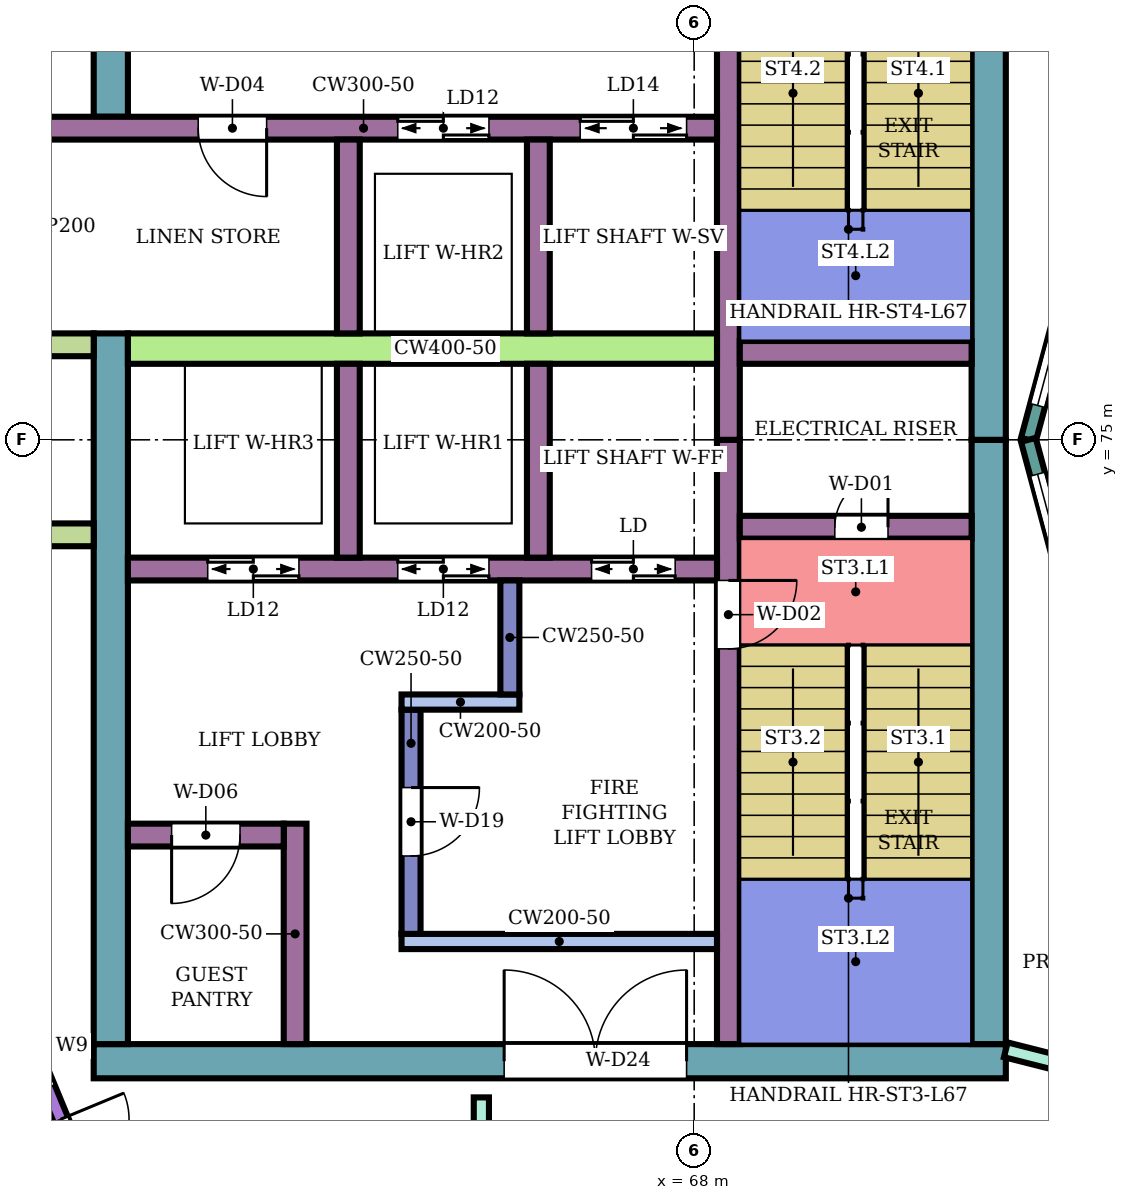
"""IFC4 building model, lengths in metres.
Left out: names, types, materials, properties, quantities, classifications, styles, units other than length and angle.
Written with IfcOpenShell. Run it as: python <this file> out.ifc"""

import sys

from ifc_helpers import new_model, si_unit, direction, frame, frame_2d, origin, place, context, subcontext, project, spatial, rectangle, extrude, element, fill, save


model = new_model("IFC4")
c1 = context("Model", 3, precision=1e-05, world=origin(), true_north=direction((0.0, 1.0)))
c2 = subcontext(c1, "Body", "Model", "MODEL_VIEW")
j1 = project(units=[si_unit("LENGTHUNIT", "METRE"), si_unit("PLANEANGLEUNIT", "RADIAN")], contexts=[c1])
p1 = place(None, origin())
s1 = spatial("IfcSite", under=j1, at=p1, CompositionType="ELEMENT")
p2 = place(p1, origin())
s2 = spatial("IfcBuilding", under=s1, at=p2, CompositionType="ELEMENT")
p3 = place(p2, frame((0.0, 0.0, 292.5)))
s3 = spatial("IfcBuildingStorey", under=s2, at=p3, CompositionType="ELEMENT", Elevation=292.5)
p4 = place(p3, frame((72.1, 66.825, 0.0), z_axis=(0.0, 0.0, 1.0), x_axis=(-1.0, 0.0, 0.0)))
e1 = element("IfcWall", 1, at=p4, inside=s3, PredefinedType="SHEAR", context=c2, shape_type="SweptSolid", body=[
    extrude(rectangle(XDim=12.0, YDim=0.45, at=frame_2d((6.0, 0.0))), origin(), (0.0, 0.0, 1.0), 3.88),
])
p5 = place(p4, frame((4.2, 0.0, 0.0)))
e2 = element("IfcOpeningElement", 2, at=p5, cuts=e1, PredefinedType="OPENING", context=c2, shape_type="SweptSolid", body=[
    extrude(rectangle(XDim=2.4, YDim=2.4, at=frame_2d((1.2, 1.2))), frame((0.0, 0.235, 0.0), z_axis=(0.0, -1.0, 0.0), x_axis=(1.0, 0.0, 0.0)), (0.0, 0.0, 1.0), 0.47),
])
for number, where, z_axis, x_axis in (
    (3, (71.875, 75.0, 0.0), (0.0, 0.0, 1.0), (0.0, -1.0, 0.0)),
    (4, (71.875, 82.95, 0.0), (0.0, 0.0, 1.0), (0.0, -1.0, 0.0)),
):
    element("IfcWall", number, at=place(p3, frame(where, z_axis=z_axis, x_axis=x_axis)), inside=s3, PredefinedType="SHEAR", context=c2, shape_type="SweptSolid", body=[
        extrude(rectangle(XDim=7.95, YDim=0.45, at=frame_2d((3.975, 0.0))), origin(), (0.0, 0.0, 1.0), 3.88),
    ])
p6 = place(p3, frame((60.325, 76.4, 0.0), z_axis=(0.0, 0.0, 1.0), x_axis=(0.0, -1.0, 0.0)))
e5 = element("IfcWall", 5, at=p6, inside=s3, PredefinedType="SHEAR", context=c2, shape_type="SweptSolid", body=[
    extrude(rectangle(XDim=9.35, YDim=0.45, at=frame_2d((4.675, 0.0))), origin(), (0.0, 0.0, 1.0), 3.88),
])
p7 = place(p3, frame((60.325, 82.95, 0.0), z_axis=(0.0, 0.0, 1.0), x_axis=(0.0, -1.0, 0.0)))
e6 = element("IfcWall", 6, at=p7, inside=s3, PredefinedType="SHEAR", context=c2, shape_type="SweptSolid", body=[
    extrude(rectangle(XDim=3.7, YDim=0.45, at=frame_2d((1.85, 0.0))), origin(), (0.0, 0.0, 1.0), 3.88),
])
p8 = place(p3, frame((68.45, 75.0, 0.0), z_axis=(0.0, 0.0, 1.0), x_axis=(0.0, -1.0, 0.0)))
e7 = element("IfcWall", 7, at=p8, inside=s3, PredefinedType="SHEAR", context=c2, shape_type="SweptSolid", body=[
    extrude(rectangle(XDim=7.95, YDim=0.3, at=frame_2d((3.975, 0.0))), origin(), (0.0, 0.0, 1.0), 3.88),
])
p9 = place(p8, frame((1.85, 0.0, 0.0)))
e8 = element("IfcOpeningElement", 8, at=p9, cuts=e7, PredefinedType="OPENING", context=c2, shape_type="SweptSolid", body=[
    extrude(rectangle(XDim=0.9, YDim=2.1, at=frame_2d((0.45, 1.05))), frame((0.0, 0.16, 0.0), z_axis=(0.0, -1.0, 0.0), x_axis=(1.0, 0.0, 0.0)), (0.0, 0.0, 1.0), 0.32),
])
p10 = place(p3, frame((68.45, 82.95, 0.0), z_axis=(0.0, 0.0, 1.0), x_axis=(0.0, -1.0, 0.0)))
e9 = element("IfcWall", 9, at=p10, inside=s3, PredefinedType="SHEAR", context=c2, shape_type="SweptSolid", body=[
    extrude(rectangle(XDim=7.95, YDim=0.3, at=frame_2d((3.975, 0.0))), origin(), (0.0, 0.0, 1.0), 3.88),
])
p11 = place(p10, frame((0.6, 0.0, 0.0)))
e10 = element("IfcOpeningElement", 10, at=p11, cuts=e9, PredefinedType="OPENING", context=c2, shape_type="SweptSolid", body=[
    extrude(rectangle(XDim=0.9, YDim=2.1, at=frame_2d((0.45, 1.05))), frame((0.0, 0.16, 0.0), z_axis=(0.0, -1.0, 0.0), x_axis=(1.0, 0.0, 0.0)), (0.0, 0.0, 1.0), 0.32),
])
p12 = place(p3, frame((71.65, 73.85, 0.0), z_axis=(0.0, 0.0, 1.0), x_axis=(-1.0, 0.0, 0.0)))
e11 = element("IfcWall", 11, at=p12, inside=s3, PredefinedType="SHEAR", context=c2, shape_type="SweptSolid", body=[
    extrude(rectangle(XDim=3.05, YDim=0.3, at=frame_2d((1.525, 0.0))), origin(), (0.0, 0.0, 1.0), 3.88),
])
p13 = place(p12, frame((1.1, 0.0, 0.0)))
e12 = element("IfcOpeningElement", 12, at=p13, cuts=e11, PredefinedType="OPENING", context=c2, shape_type="SweptSolid", body=[
    extrude(rectangle(XDim=0.7, YDim=2.0, at=frame_2d((0.35, 1.0))), frame((0.0, 0.16, 0.0), z_axis=(0.0, -1.0, 0.0), x_axis=(1.0, 0.0, 0.0)), (0.0, 0.0, 1.0), 0.32),
])
p14 = place(p3, frame((71.65, 76.15, 0.0), z_axis=(0.0, 0.0, 1.0), x_axis=(-1.0, 0.0, 0.0)))
e13 = element("IfcWall", 13, at=p14, inside=s3, PredefinedType="SHEAR", context=c2, shape_type="SweptSolid", body=[
    extrude(rectangle(XDim=3.05, YDim=0.3, at=frame_2d((1.525, 0.0))), origin(), (0.0, 0.0, 1.0), 3.88),
])
p15 = place(p3, frame((68.3, 73.3, 0.0), z_axis=(0.0, 0.0, 1.0), x_axis=(-1.0, 0.0, 0.0)))
e14 = element("IfcWall", 14, at=p15, inside=s3, PredefinedType="SHEAR", context=c2, shape_type="SweptSolid", body=[
    extrude(rectangle(XDim=7.75, YDim=0.3, at=frame_2d((3.875, 0.0))), origin(), (0.0, 0.0, 1.0), 3.88),
])
p16 = place(p15, frame((0.55, 0.0, 0.0)))
e15 = element("IfcOpeningElement", 15, at=p16, cuts=e14, PredefinedType="OPENING", context=c2, shape_type="SweptSolid", body=[
    extrude(rectangle(XDim=1.1, YDim=2.1, at=frame_2d((0.55, 1.05))), frame((0.0, 0.16, 0.0), z_axis=(0.0, -1.0, 0.0), x_axis=(1.0, 0.0, 0.0)), (0.0, 0.0, 1.0), 0.32),
])
p17 = place(p15, frame((3.0, 0.0, 0.0)))
e16 = element("IfcOpeningElement", 16, at=p17, cuts=e14, PredefinedType="OPENING", context=c2, shape_type="SweptSolid", body=[
    extrude(rectangle(XDim=1.2, YDim=2.1, at=frame_2d((0.6, 1.05))), frame((0.0, 0.16, 0.0), z_axis=(0.0, -1.0, 0.0), x_axis=(1.0, 0.0, 0.0)), (0.0, 0.0, 1.0), 0.32),
])
p18 = place(p15, frame((5.5, 0.0, 0.0)))
e17 = element("IfcOpeningElement", 17, at=p18, cuts=e14, PredefinedType="OPENING", context=c2, shape_type="SweptSolid", body=[
    extrude(rectangle(XDim=1.2, YDim=2.1, at=frame_2d((0.6, 1.05))), frame((0.0, 0.16, 0.0), z_axis=(0.0, -1.0, 0.0), x_axis=(1.0, 0.0, 0.0)), (0.0, 0.0, 1.0), 0.32),
])
p19 = place(p3, frame((68.3, 76.2, 0.0), z_axis=(0.0, 0.0, 1.0), x_axis=(-1.0, 0.0, 0.0)))
e18 = element("IfcWall", 18, at=p19, inside=s3, PredefinedType="SHEAR", context=c2, shape_type="SweptSolid", body=[
    extrude(rectangle(XDim=7.75, YDim=0.4, at=frame_2d((3.875, 0.0))), origin(), (0.0, 0.0, 1.0), 3.88),
])
p20 = place(p3, frame((68.3, 79.1, 0.0), z_axis=(0.0, 0.0, 1.0), x_axis=(-1.0, 0.0, 0.0)))
e19 = element("IfcWall", 19, at=p20, inside=s3, PredefinedType="SHEAR", context=c2, shape_type="SweptSolid", body=[
    extrude(rectangle(XDim=9.3, YDim=0.3, at=frame_2d((4.65, 0.0))), origin(), (0.0, 0.0, 1.0), 3.88),
])
p21 = place(p20, frame((0.4, 0.0, 0.0)))
e20 = element("IfcOpeningElement", 20, at=p21, cuts=e19, PredefinedType="OPENING", context=c2, shape_type="SweptSolid", body=[
    extrude(rectangle(XDim=1.4, YDim=2.1, at=frame_2d((0.7, 1.05))), frame((0.0, 0.16, 0.0), z_axis=(0.0, -1.0, 0.0), x_axis=(1.0, 0.0, 0.0)), (0.0, 0.0, 1.0), 0.32),
])
p22 = place(p20, frame((3.0, 0.0, 0.0)))
e21 = element("IfcOpeningElement", 21, at=p22, cuts=e19, PredefinedType="OPENING", context=c2, shape_type="SweptSolid", body=[
    extrude(rectangle(XDim=1.2, YDim=2.1, at=frame_2d((0.6, 1.05))), frame((0.0, 0.16, 0.0), z_axis=(0.0, -1.0, 0.0), x_axis=(1.0, 0.0, 0.0)), (0.0, 0.0, 1.0), 0.32),
])
p23 = place(p20, frame((5.925, 0.0, 0.0)))
e22 = element("IfcOpeningElement", 22, at=p23, cuts=e19, PredefinedType="OPENING", context=c2, shape_type="SweptSolid", body=[
    extrude(rectangle(XDim=0.9, YDim=2.1, at=frame_2d((0.45, 1.05))), frame((0.0, 0.16, 0.0), z_axis=(0.0, -1.0, 0.0), x_axis=(1.0, 0.0, 0.0)), (0.0, 0.0, 1.0), 0.32),
])
for number, where, z_axis, x_axis in (
    (23, (65.95, 76.0, 0.0), (0.0, 0.0, 1.0), (0.0, -1.0, 0.0)),
    (24, (63.45, 76.0, 0.0), (0.0, 0.0, 1.0), (0.0, -1.0, 0.0)),
    (25, (65.95, 78.95, 0.0), (0.0, 0.0, 1.0), (0.0, -1.0, 0.0)),
    (26, (63.45, 78.95, 0.0), (0.0, 0.0, 1.0), (0.0, -1.0, 0.0)),
):
    element("IfcWall", number, at=place(p3, frame(where, z_axis=z_axis, x_axis=x_axis)), inside=s3, PredefinedType="SHEAR", context=c2, shape_type="SweptSolid", body=[
        extrude(rectangle(XDim=2.55, YDim=0.3, at=frame_2d((1.275, 0.0))), origin(), (0.0, 0.0, 1.0), 3.88),
    ])
p24 = place(p3, frame((68.3, 68.4, 0.0), z_axis=(0.0, 0.0, 1.0), x_axis=(-1.0, 0.0, 0.0)))
e27 = element("IfcWall", 27, at=p24, inside=s3, PredefinedType="SHEAR", context=c2, shape_type="SweptSolid", body=[
    extrude(rectangle(XDim=4.15, YDim=0.2, at=frame_2d((2.075, 0.0))), origin(), (0.0, 0.0, 1.0), 3.88),
])
p25 = place(p3, frame((64.275, 71.45, 0.0), z_axis=(0.0, 0.0, 1.0), x_axis=(0.0, -1.0, 0.0)))
e28 = element("IfcWall", 28, at=p25, inside=s3, PredefinedType="SHEAR", context=c2, shape_type="SweptSolid", body=[
    extrude(rectangle(XDim=2.95, YDim=0.25, at=frame_2d((1.475, 0.0))), origin(), (0.0, 0.0, 1.0), 3.88),
])
p26 = place(p25, frame((1.025, 0.0, 0.0)))
e29 = element("IfcOpeningElement", 29, at=p26, cuts=e28, PredefinedType="OPENING", context=c2, shape_type="SweptSolid", body=[
    extrude(rectangle(XDim=0.9, YDim=2.1, at=frame_2d((0.45, 1.05))), frame((0.0, 0.135, 0.0), z_axis=(0.0, -1.0, 0.0), x_axis=(1.0, 0.0, 0.0)), (0.0, 0.0, 1.0), 0.27),
])
p27 = place(p3, frame((65.7, 71.55, 0.0), z_axis=(0.0, 0.0, 1.0), x_axis=(-1.0, 0.0, 0.0)))
e30 = element("IfcWall", 30, at=p27, inside=s3, PredefinedType="SHEAR", context=c2, shape_type="SweptSolid", body=[
    extrude(rectangle(XDim=1.55, YDim=0.2, at=frame_2d((0.775, 0.0))), origin(), (0.0, 0.0, 1.0), 3.88),
])
p28 = place(p3, frame((65.575, 73.15, 0.0), z_axis=(0.0, 0.0, 1.0), x_axis=(0.0, -1.0, 0.0)))
e31 = element("IfcWall", 31, at=p28, inside=s3, PredefinedType="SHEAR", context=c2, shape_type="SweptSolid", body=[
    extrude(rectangle(XDim=1.5, YDim=0.25, at=frame_2d((0.75, 0.0))), origin(), (0.0, 0.0, 1.0), 3.88),
])
p29 = place(p3, frame((62.75, 69.95, 0.0), z_axis=(0.0, 0.0, 1.0), x_axis=(0.0, -1.0, 0.0)))
e32 = element("IfcWall", 32, at=p29, inside=s3, PredefinedType="SHEAR", context=c2, shape_type="SweptSolid", body=[
    extrude(rectangle(XDim=2.9, YDim=0.3, at=frame_2d((1.45, 0.0))), origin(), (0.0, 0.0, 1.0), 3.88),
])
p30 = place(p3, frame((62.6, 69.8, 0.0), z_axis=(0.0, 0.0, 1.0), x_axis=(-1.0, 0.0, 0.0)))
e33 = element("IfcWall", 33, at=p30, inside=s3, PredefinedType="SHEAR", context=c2, shape_type="SweptSolid", body=[
    extrude(rectangle(XDim=2.05, YDim=0.3, at=frame_2d((1.025, 0.0))), origin(), (0.0, 0.0, 1.0), 3.88),
])
p31 = place(p30, frame((0.575, 0.0, 0.0)))
e34 = element("IfcOpeningElement", 34, at=p31, cuts=e33, PredefinedType="OPENING", context=c2, shape_type="SweptSolid", body=[
    extrude(rectangle(XDim=0.9, YDim=2.1, at=frame_2d((0.45, 1.05))), frame((0.0, 0.16, 0.0), z_axis=(0.0, -1.0, 0.0), x_axis=(1.0, 0.0, 0.0)), (0.0, 0.0, 1.0), 0.32),
])
p32 = place(p3, frame((58.364, 69.203, 0.0), z_axis=(0.0, 0.0, 1.0), x_axis=(0.382708254591, -0.923869250418, 0.0)))
e35 = element("IfcWall", 35, at=p32, inside=s3, PredefinedType="NOTDEFINED", context=c2, shape_type="SweptSolid", body=[
    extrude(rectangle(XDim=5.847, YDim=0.2, at=frame_2d((2.924, 0.0))), origin(), (0.0, 0.0, 1.0), 4.2),
])
p33 = place(p32, frame((1.75, 0.0, 0.9)))
e36 = element("IfcOpeningElement", 36, at=p33, cuts=e35, PredefinedType="OPENING", context=c2, shape_type="SweptSolid", body=[
    extrude(rectangle(XDim=1.2, YDim=2.7, at=frame_2d((0.6, 1.35))), frame((0.0, 0.11, 0.0), z_axis=(0.0, -1.0, 0.0), x_axis=(1.0, 0.0, 0.0)), (0.0, 0.0, 1.0), 0.22),
])
p34 = place(p32, frame((3.4, 0.0, 0.0)))
e37 = element("IfcOpeningElement", 37, at=p34, cuts=e35, PredefinedType="OPENING", context=c2, shape_type="SweptSolid", body=[
    extrude(rectangle(XDim=1.8, YDim=2.7, at=frame_2d((0.9, 1.35))), frame((0.0, 0.11, 0.0), z_axis=(0.0, -1.0, 0.0), x_axis=(1.0, 0.0, 0.0)), (0.0, 0.0, 1.0), 0.22),
])
for number, where, z_axis, x_axis in (
    (38, (60.1, 76.25, 0.0), (0.0, 0.0, 1.0), (-1.0, 0.0, 0.0)),
    (39, (60.1, 73.75, 0.0), (0.0, 0.0, 1.0), (-1.0, 0.0, 0.0)),
):
    element("IfcWall", number, at=place(p3, frame(where, z_axis=z_axis, x_axis=x_axis)), inside=s3, PredefinedType="NOTDEFINED", context=c2, shape_type="SweptSolid", body=[
        extrude(rectangle(XDim=2.416, YDim=0.3, at=frame_2d((1.208, 0.0))), origin(), (0.0, 0.0, 1.0), 4.2),
    ])
p35 = place(p3, frame((73.415, 78.802, 0.0), z_axis=(0.0, 0.0, 1.0), x_axis=(-0.258789828301, -0.965933654434, 0.0)))
e40 = element("IfcWall", 40, at=p35, inside=s3, PredefinedType="NOTDEFINED", context=c2, shape_type="SweptSolid", body=[
    extrude(rectangle(XDim=3.936, YDim=0.2, at=frame_2d((1.968, 0.0))), origin(), (0.0, 0.0, 1.0), 4.2),
])
p36 = place(p35, frame((0.468, 0.0, 0.9)))
e41 = element("IfcOpeningElement", 41, at=p36, cuts=e40, PredefinedType="OPENING", context=c2, shape_type="SweptSolid", body=[
    extrude(rectangle(XDim=3.0, YDim=2.3, at=frame_2d((1.5, 1.15))), frame((0.0, 0.11, 0.0), z_axis=(0.0, -1.0, 0.0), x_axis=(1.0, 0.0, 0.0)), (0.0, 0.0, 1.0), 0.22),
])
p37 = place(p3, frame((72.396, 75.0, 0.0), z_axis=(0.0, 0.0, 1.0), x_axis=(0.258789828301, -0.965933654434, 0.0)))
e42 = element("IfcWall", 42, at=p37, inside=s3, PredefinedType="NOTDEFINED", context=c2, shape_type="SweptSolid", body=[
    extrude(rectangle(XDim=3.936, YDim=0.2, at=frame_2d((1.968, 0.0))), origin(), (0.0, 0.0, 1.0), 4.2),
])
p38 = place(p37, frame((0.468, 0.0, 0.9)))
e43 = element("IfcOpeningElement", 43, at=p38, cuts=e42, PredefinedType="OPENING", context=c2, shape_type="SweptSolid", body=[
    extrude(rectangle(XDim=3.0, YDim=2.3, at=frame_2d((1.5, 1.15))), frame((0.0, 0.11, 0.0), z_axis=(0.0, -1.0, 0.0), x_axis=(1.0, 0.0, 0.0)), (0.0, 0.0, 1.0), 0.22),
])
p39 = place(p3, frame((65.2, 65.2, 0.0), z_axis=(0.0, 0.0, 1.0), x_axis=(0.0, 1.0, 0.0)))
e44 = element("IfcWall", 44, at=p39, inside=s3, PredefinedType="PARTITIONING", context=c2, shape_type="SweptSolid", body=[
    extrude(rectangle(XDim=1.149, YDim=0.2, at=frame_2d((0.575, 0.0))), origin(), (0.0, 0.0, 1.0), 3.75),
])
p40 = place(p3, frame((72.1, 66.975, 0.0), z_axis=(0.0, 0.0, 1.0), x_axis=(0.969471314457, -0.245204752086, 0.0)))
e45 = element("IfcWall", 45, at=p40, inside=s3, PredefinedType="PARTITIONING", context=c2, shape_type="SweptSolid", body=[
    extrude(rectangle(XDim=2.582, YDim=0.2, at=frame_2d((1.291, 0.0))), origin(), (0.0, 0.0, 1.0), 3.75),
])
p41 = place(p40, frame((0.841, 0.0, 0.0)))
e46 = element("IfcOpeningElement", 46, at=p41, cuts=e45, PredefinedType="OPENING", context=c2, shape_type="SweptSolid", body=[
    extrude(rectangle(XDim=0.9, YDim=2.1, at=frame_2d((0.45, 1.05))), frame((0.0, 0.11, 0.0), z_axis=(0.0, -1.0, 0.0), x_axis=(1.0, 0.0, 0.0)), (0.0, 0.0, 1.0), 0.22),
])
p42 = place(p34, origin())
e47 = element("IfcDoor", 47, at=p42, inside=s3, OperationType="DOUBLE_DOOR_SINGLE_SWING", PredefinedType="DOOR", context=c2, shape_type="SweptSolid", body=[
    extrude(rectangle(XDim=1.8, YDim=2.7, at=frame_2d((0.9, 1.35))), frame((0.0, 0.025, 0.0), z_axis=(0.0, -1.0, 0.0), x_axis=(1.0, 0.0, 0.0)), (0.0, 0.0, 1.0), 0.05),
])
fill(e37, e47)
p43 = place(p36, origin())
e48 = element("IfcWindow", 48, at=p43, inside=s3, PartitioningType="SINGLE_PANEL", PredefinedType="WINDOW", context=c2, shape_type="SweptSolid", body=[
    extrude(rectangle(XDim=3.0, YDim=2.3, at=frame_2d((1.5, 1.15))), frame((0.0, 0.03, 0.0), z_axis=(0.0, -1.0, 0.0), x_axis=(1.0, 0.0, 0.0)), (0.0, 0.0, 1.0), 0.06),
])
fill(e41, e48)
p44 = place(p38, origin())
e49 = element("IfcWindow", 49, at=p44, inside=s3, PartitioningType="SINGLE_PANEL", PredefinedType="WINDOW", context=c2, shape_type="SweptSolid", body=[
    extrude(rectangle(XDim=3.0, YDim=2.3, at=frame_2d((1.5, 1.15))), frame((0.0, 0.03, 0.0), z_axis=(0.0, -1.0, 0.0), x_axis=(1.0, 0.0, 0.0)), (0.0, 0.0, 1.0), 0.06),
])
fill(e43, e49)
p45 = place(p13, frame((0.7, 0.0, 0.0), z_axis=(0.0, 0.0, 1.0), x_axis=(-1.0, 0.0, 0.0)))
e50 = element("IfcDoor", 50, at=p45, inside=s3, OperationType="SINGLE_SWING_RIGHT", PredefinedType="DOOR", context=c2, shape_type="SweptSolid", body=[
    extrude(rectangle(XDim=0.7, YDim=2.0, at=frame_2d((0.35, 1.0))), frame((0.0, 0.025, 0.0), z_axis=(0.0, -1.0, 0.0), x_axis=(1.0, 0.0, 0.0)), (0.0, 0.0, 1.0), 0.05),
])
fill(e12, e50)
p46 = place(p9, origin())
e51 = element("IfcDoor", 51, at=p46, inside=s3, OperationType="SINGLE_SWING_LEFT", PredefinedType="DOOR", context=c2, shape_type="SweptSolid", body=[
    extrude(rectangle(XDim=0.9, YDim=2.1, at=frame_2d((0.45, 1.05))), frame((0.0, 0.025, 0.0), z_axis=(0.0, -1.0, 0.0), x_axis=(1.0, 0.0, 0.0)), (0.0, 0.0, 1.0), 0.05),
])
fill(e8, e51)
p47 = place(p16, origin())
e52 = element("IfcDoor", 52, at=p47, inside=s3, OperationType="DOUBLE_DOOR_SLIDING", PredefinedType="DOOR", context=c2, shape_type="SweptSolid", body=[
    extrude(rectangle(XDim=1.1, YDim=2.1, at=frame_2d((0.55, 1.05))), frame((0.0, 0.025, 0.0), z_axis=(0.0, -1.0, 0.0), x_axis=(1.0, 0.0, 0.0)), (0.0, 0.0, 1.0), 0.05),
])
fill(e15, e52)
p48 = place(p17, origin())
e53 = element("IfcDoor", 53, at=p48, inside=s3, OperationType="DOUBLE_DOOR_SLIDING", PredefinedType="DOOR", context=c2, shape_type="SweptSolid", body=[
    extrude(rectangle(XDim=1.2, YDim=2.1, at=frame_2d((0.6, 1.05))), frame((0.0, 0.025, 0.0), z_axis=(0.0, -1.0, 0.0), x_axis=(1.0, 0.0, 0.0)), (0.0, 0.0, 1.0), 0.05),
])
fill(e16, e53)
p49 = place(p18, origin())
e54 = element("IfcDoor", 54, at=p49, inside=s3, OperationType="DOUBLE_DOOR_SLIDING", PredefinedType="DOOR", context=c2, shape_type="SweptSolid", body=[
    extrude(rectangle(XDim=1.2, YDim=2.1, at=frame_2d((0.6, 1.05))), frame((0.0, 0.025, 0.0), z_axis=(0.0, -1.0, 0.0), x_axis=(1.0, 0.0, 0.0)), (0.0, 0.0, 1.0), 0.05),
])
fill(e17, e54)
p50 = place(p21, origin())
e55 = element("IfcDoor", 55, at=p50, inside=s3, OperationType="DOUBLE_DOOR_SLIDING", PredefinedType="DOOR", context=c2, shape_type="SweptSolid", body=[
    extrude(rectangle(XDim=1.4, YDim=2.1, at=frame_2d((0.7, 1.05))), frame((0.0, 0.025, 0.0), z_axis=(0.0, -1.0, 0.0), x_axis=(1.0, 0.0, 0.0)), (0.0, 0.0, 1.0), 0.05),
])
fill(e20, e55)
p51 = place(p22, origin())
e56 = element("IfcDoor", 56, at=p51, inside=s3, OperationType="DOUBLE_DOOR_SLIDING", PredefinedType="DOOR", context=c2, shape_type="SweptSolid", body=[
    extrude(rectangle(XDim=1.2, YDim=2.1, at=frame_2d((0.6, 1.05))), frame((0.0, 0.025, 0.0), z_axis=(0.0, -1.0, 0.0), x_axis=(1.0, 0.0, 0.0)), (0.0, 0.0, 1.0), 0.05),
])
fill(e21, e56)
p52 = place(p23, origin())
e57 = element("IfcDoor", 57, at=p52, inside=s3, OperationType="SINGLE_SWING_LEFT", PredefinedType="DOOR", context=c2, shape_type="SweptSolid", body=[
    extrude(rectangle(XDim=0.9, YDim=2.1, at=frame_2d((0.45, 1.05))), frame((0.0, 0.025, 0.0), z_axis=(0.0, -1.0, 0.0), x_axis=(1.0, 0.0, 0.0)), (0.0, 0.0, 1.0), 0.05),
])
fill(e22, e57)
p53 = place(p26, origin())
e58 = element("IfcDoor", 58, at=p53, inside=s3, OperationType="SINGLE_SWING_LEFT", PredefinedType="DOOR", context=c2, shape_type="SweptSolid", body=[
    extrude(rectangle(XDim=0.9, YDim=2.1, at=frame_2d((0.45, 1.05))), frame((0.0, 0.025, 0.0), z_axis=(0.0, -1.0, 0.0), x_axis=(1.0, 0.0, 0.0)), (0.0, 0.0, 1.0), 0.05),
])
fill(e29, e58)
p54 = place(p31, origin())
e59 = element("IfcDoor", 59, at=p54, inside=s3, OperationType="SINGLE_SWING_RIGHT", PredefinedType="DOOR", context=c2, shape_type="SweptSolid", body=[
    extrude(rectangle(XDim=0.9, YDim=2.1, at=frame_2d((0.45, 1.05))), frame((0.0, 0.025, 0.0), z_axis=(0.0, -1.0, 0.0), x_axis=(1.0, 0.0, 0.0)), (0.0, 0.0, 1.0), 0.05),
])
fill(e34, e59)
p55 = place(p5, frame((2.4, 0.0, 0.0), z_axis=(0.0, 0.0, 1.0), x_axis=(-1.0, 0.0, 0.0)))
e60 = element("IfcDoor", 60, at=p55, inside=s3, OperationType="DOUBLE_DOOR_SINGLE_SWING", PredefinedType="DOOR", context=c2, shape_type="SweptSolid", body=[
    extrude(rectangle(XDim=2.4, YDim=2.4, at=frame_2d((1.2, 1.2))), frame((0.0, 0.025, 0.0), z_axis=(0.0, -1.0, 0.0), x_axis=(1.0, 0.0, 0.0)), (0.0, 0.0, 1.0), 0.05),
])
fill(e2, e60)
save(model, sys.argv[1])
